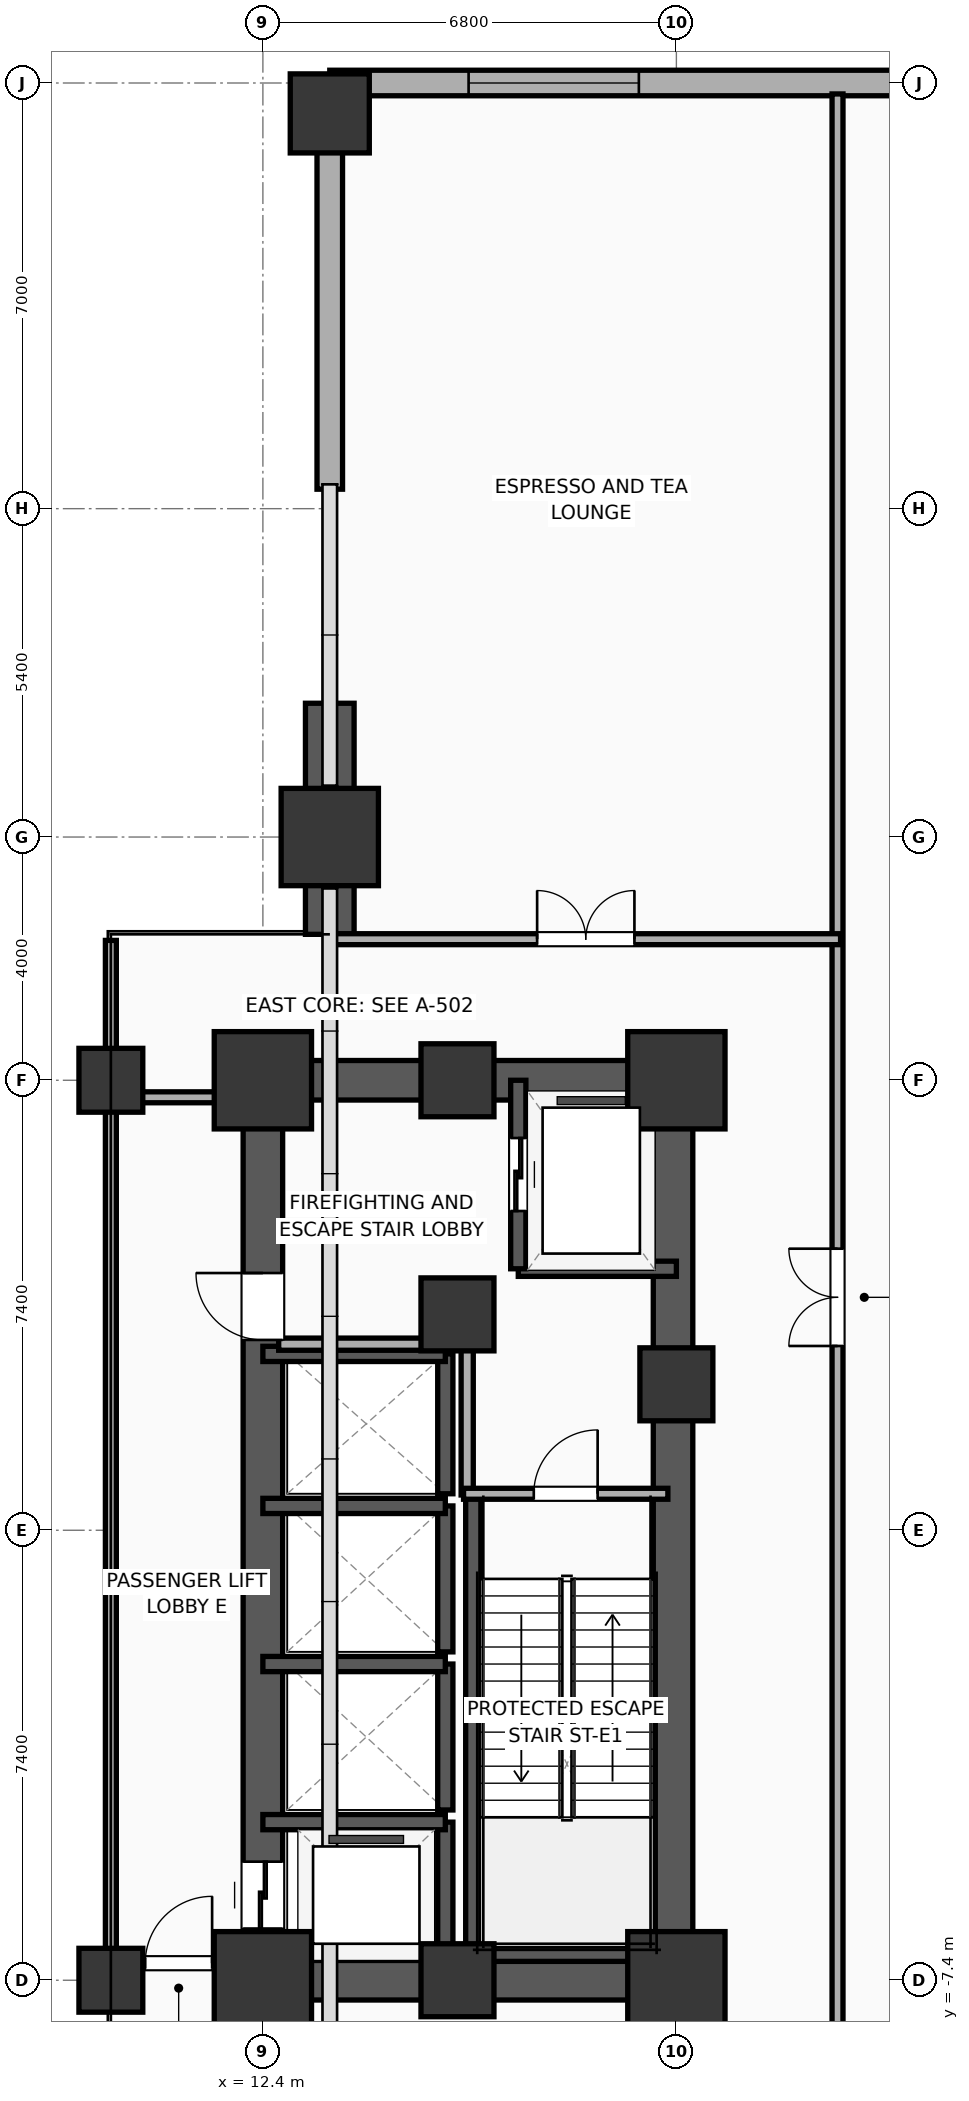
"""IFC4 building model, lengths in metres.
Left out: names, types, materials, properties, quantities, classifications, styles, units other than length and angle.
Written with IfcOpenShell. Run it as: python <this file> out.ifc"""

import sys

from ifc_helpers import new_model, si_unit, direction, frame, frame_2d, origin, origin_2d, place, context, subcontext, project, spatial, rectangle, extrude, element, fill, save


model = new_model("IFC4")
c1 = context("Model", 3, precision=1e-05, world=origin(), true_north=direction((0.0, 1.0)))
c2 = subcontext(c1, "Body", "Model", "MODEL_VIEW")
j1 = project(units=[si_unit("LENGTHUNIT", "METRE"), si_unit("PLANEANGLEUNIT", "RADIAN")], contexts=[c1])
p1 = place(None, origin())
s1 = spatial("IfcSite", under=j1, at=p1, CompositionType="ELEMENT")
p2 = place(p1, origin())
s2 = spatial("IfcBuilding", under=s1, at=p2, CompositionType="ELEMENT")
p3 = place(p2, frame((0.0, 0.0, 5.2)))
s3 = spatial("IfcBuildingStorey", under=s2, at=p3, CompositionType="ELEMENT", Elevation=5.2)
p4 = place(p3, frame((12.4, -7.4, 0.0), z_axis=(0.0, 0.0, 1.0), x_axis=(1.0, 0.0, 0.0)))
e1 = element("IfcColumn", 1, at=p4, inside=s3, PredefinedType="COLUMN", context=c2, shape_type="SweptSolid", body=[
    extrude(rectangle(XDim=1.6, YDim=1.6, at=origin_2d()), origin(), (0.0, 0.0, 1.0), 5.2),
])
p5 = place(p3, frame((15.6, 3.55, 0.0), z_axis=(0.0, 0.0, 1.0), x_axis=(1.0, 0.0, 0.0)))
e2 = element("IfcColumn", 2, at=p5, inside=s3, PredefinedType="COLUMN", context=c2, shape_type="SweptSolid", body=[
    extrude(rectangle(XDim=1.2, YDim=1.2, at=origin_2d()), origin(), (0.0, 0.0, 1.0), 5.2),
])
p6 = place(p3, frame((12.4, 7.4, 0.0), z_axis=(0.0, 0.0, 1.0), x_axis=(1.0, 0.0, 0.0)))
e3 = element("IfcColumn", 3, at=p6, inside=s3, PredefinedType="COLUMN", context=c2, shape_type="SweptSolid", body=[
    extrude(rectangle(XDim=1.6, YDim=1.6, at=origin_2d()), origin(), (0.0, 0.0, 1.0), 5.2),
])
for number, where, z_axis, x_axis in (
    (4, (15.6, -7.4, 0.0), (0.0, 0.0, 1.0), (1.0, 0.0, 0.0)),
    (5, (15.6, 7.4, 0.0), (0.0, 0.0, 1.0), (1.0, 0.0, 0.0)),
):
    element("IfcColumn", number, at=place(p3, frame(where, z_axis=z_axis, x_axis=x_axis)), inside=s3, PredefinedType="COLUMN", context=c2, shape_type="SweptSolid", body=[
        extrude(rectangle(XDim=1.2, YDim=1.2, at=origin_2d()), origin(), (0.0, 0.0, 1.0), 5.2),
    ])
p7 = place(p3, frame((19.2, -7.4, 0.0), z_axis=(0.0, 0.0, 1.0), x_axis=(1.0, 0.0, 0.0)))
e6 = element("IfcColumn", 6, at=p7, inside=s3, PredefinedType="COLUMN", context=c2, shape_type="SweptSolid", body=[
    extrude(rectangle(XDim=1.6, YDim=1.6, at=origin_2d()), origin(), (0.0, 0.0, 1.0), 5.2),
])
p8 = place(p3, frame((19.2, 2.4, 0.0), z_axis=(0.0, 0.0, 1.0), x_axis=(1.0, 0.0, 0.0)))
e7 = element("IfcColumn", 7, at=p8, inside=s3, PredefinedType="COLUMN", context=c2, shape_type="SweptSolid", body=[
    extrude(rectangle(XDim=1.2, YDim=1.2, at=origin_2d()), origin(), (0.0, 0.0, 1.0), 5.2),
])
p9 = place(p3, frame((19.2, 7.4, 0.0), z_axis=(0.0, 0.0, 1.0), x_axis=(1.0, 0.0, 0.0)))
e8 = element("IfcColumn", 8, at=p9, inside=s3, PredefinedType="COLUMN", context=c2, shape_type="SweptSolid", body=[
    extrude(rectangle(XDim=1.6, YDim=1.6, at=origin_2d()), origin(), (0.0, 0.0, 1.0), 5.2),
])
for number, where, z_axis, x_axis in (
    (9, (12.075, -7.4, 0.0), (0.0, 0.0, 1.0), (1.0, 0.0, 0.0)),
    (10, (12.075, 7.4, 0.0), (0.0, 0.0, 1.0), (1.0, 0.0, 0.0)),
):
    element("IfcWall", number, at=place(p3, frame(where, z_axis=z_axis, x_axis=x_axis)), inside=s3, PredefinedType="SHEAR", context=c2, shape_type="SweptSolid", body=[
        extrude(rectangle(XDim=7.45, YDim=0.65, at=frame_2d((3.725, 0.0))), origin(), (0.0, 0.0, 1.0), 4.92),
    ])
p10 = place(p3, frame((12.4, -7.4, 0.0), z_axis=(0.0, 0.0, 1.0), x_axis=(0.0, 1.0, 0.0)))
e11 = element("IfcWall", 11, at=p10, inside=s3, PredefinedType="SHEAR", context=c2, shape_type="SweptSolid", body=[
    extrude(rectangle(XDim=14.8, YDim=0.65, at=frame_2d((7.4, 0.0))), origin(), (0.0, 0.0, 1.0), 4.92),
])
p11 = place(p10, frame((0.85, 0.0, 0.0)))
e12 = element("IfcOpeningElement", 12, at=p11, cuts=e11, PredefinedType="OPENING", context=c2, shape_type="SweptSolid", body=[
    extrude(rectangle(XDim=1.1, YDim=2.05, at=frame_2d((0.55, 1.025))), frame((0.0, 0.335, 0.0), z_axis=(0.0, -1.0, 0.0), x_axis=(1.0, 0.0, 0.0)), (0.0, 0.0, 1.0), 0.67),
])
p12 = place(p10, frame((10.53, 0.0, 0.0)))
e13 = element("IfcOpeningElement", 13, at=p12, cuts=e11, PredefinedType="OPENING", context=c2, shape_type="SweptSolid", body=[
    extrude(rectangle(XDim=1.1, YDim=2.05, at=frame_2d((0.55, 1.025))), frame((0.0, 0.335, 0.0), z_axis=(0.0, -1.0, 0.0), x_axis=(1.0, 0.0, 0.0)), (0.0, 0.0, 1.0), 0.67),
])
p13 = place(p3, frame((19.145, -7.4, 0.0), z_axis=(0.0, 0.0, 1.0), x_axis=(0.0, 1.0, 0.0)))
e14 = element("IfcWall", 14, at=p13, inside=s3, PredefinedType="SHEAR", context=c2, shape_type="SweptSolid", body=[
    extrude(rectangle(XDim=14.8, YDim=0.65, at=frame_2d((7.4, 0.0))), origin(), (0.0, 0.0, 1.0), 4.92),
])
p14 = place(p3, frame((15.86, -7.085, 0.0), z_axis=(0.0, 0.0, 1.0), x_axis=(0.0, 1.0, 0.0)))
e15 = element("IfcWall", 15, at=p14, inside=s3, PredefinedType="SOLIDWALL", context=c2, shape_type="SweptSolid", body=[
    extrude(rectangle(XDim=7.685, YDim=0.25, at=frame_2d((3.843, 0.0))), origin(), (0.0, 0.0, 1.0), 4.92),
])
p15 = place(p3, frame((15.74, -6.965, 0.0), z_axis=(0.0, 0.0, 1.0), x_axis=(1.0, 0.0, 0.0)))
e16 = element("IfcWall", 16, at=p15, inside=s3, PredefinedType="SOLIDWALL", context=c2, shape_type="SweptSolid", body=[
    extrude(rectangle(XDim=3.46, YDim=0.25, at=frame_2d((1.73, 0.0))), origin(), (0.0, 0.0, 1.0), 4.92),
])
for number, where, z_axis, x_axis in (
    (17, (9.9, -7.4, 0.0), (0.0, 0.0, 1.0), (1.0, 0.0, 0.0)),
    (18, (9.9, 7.4, 0.0), (0.0, 0.0, 1.0), (1.0, 0.0, 0.0)),
):
    element("IfcColumn", number, at=place(p3, frame(where, z_axis=z_axis, x_axis=x_axis)), inside=s3, PredefinedType="COLUMN", context=c2, shape_type="SweptSolid", body=[
        extrude(rectangle(XDim=1.05, YDim=1.05, at=origin_2d()), origin(), (0.0, 0.0, 1.0), 5.2),
    ])
p16 = place(p3, frame((13.5, 11.4, 0.0), z_axis=(0.0, 0.0, 1.0), x_axis=(1.0, 0.0, 0.0)))
e19 = element("IfcColumn", 19, at=p16, inside=s3, PredefinedType="COLUMN", context=c2, shape_type="SweptSolid", body=[
    extrude(rectangle(XDim=1.6, YDim=1.6, at=origin_2d()), origin(), (0.0, 0.0, 1.0), 5.2),
])
p17 = place(p3, frame((13.5, 23.3, 0.0), z_axis=(0.0, 0.0, 1.0), x_axis=(1.0, 0.0, 0.0)))
e20 = element("IfcColumn", 20, at=p17, inside=s3, PredefinedType="COLUMN", context=c2, shape_type="SweptSolid", body=[
    extrude(rectangle(XDim=1.3, YDim=1.3, at=origin_2d()), origin(), (0.0, 0.0, 1.0), 5.2),
])
p18 = place(p3, frame((13.5, 9.8, 0.0), z_axis=(0.0, 0.0, 1.0), x_axis=(0.0, 1.0, 0.0)))
e21 = element("IfcWall", 21, at=p18, inside=s3, PredefinedType="SOLIDWALL", context=c2, shape_type="SweptSolid", body=[
    extrude(rectangle(XDim=3.8, YDim=0.8, at=frame_2d((1.9, 0.0))), origin(), (0.0, 0.0, 1.0), 4.92),
])
p19 = place(p3, frame((35.6, 23.8, 0.0), z_axis=(0.0, 0.0, 1.0), x_axis=(-1.0, 0.0, 0.0)))
e22 = element("IfcWall", 22, at=p19, inside=s3, PredefinedType="ELEMENTEDWALL", context=c2, shape_type="SweptSolid", body=[
    extrude(rectangle(XDim=22.1, YDim=0.42, at=frame_2d((11.05, 0.0))), origin(), (0.0, 0.0, 1.0), 4.92),
])
p20 = place(p19, frame((2.283, 0.0, 0.65)))
e23 = element("IfcOpeningElement", 23, at=p20, cuts=e22, PredefinedType="OPENING", context=c2, shape_type="SweptSolid", body=[
    extrude(rectangle(XDim=2.8, YDim=2.6, at=frame_2d((1.4, 1.3))), frame((0.0, 0.22, 0.0), z_axis=(0.0, -1.0, 0.0), x_axis=(1.0, 0.0, 0.0)), (0.0, 0.0, 1.0), 0.44),
])
p21 = place(p19, frame((17.017, 0.0, 0.65)))
e24 = element("IfcOpeningElement", 24, at=p21, cuts=e22, PredefinedType="OPENING", context=c2, shape_type="SweptSolid", body=[
    extrude(rectangle(XDim=2.8, YDim=2.6, at=frame_2d((1.4, 1.3))), frame((0.0, 0.22, 0.0), z_axis=(0.0, -1.0, 0.0), x_axis=(1.0, 0.0, 0.0)), (0.0, 0.0, 1.0), 0.44),
])
p22 = place(p3, frame((13.5, 17.12, 0.0), z_axis=(0.0, 0.0, 1.0), x_axis=(0.0, 1.0, 0.0)))
e25 = element("IfcWall", 25, at=p22, inside=s3, PredefinedType="ELEMENTEDWALL", context=c2, shape_type="SweptSolid", body=[
    extrude(rectangle(XDim=6.68, YDim=0.42, at=frame_2d((3.34, 0.0))), origin(), (0.0, 0.0, 1.0), 4.21),
])
p23 = place(p3, frame((16.6, 4.3, 0.0), z_axis=(0.0, 0.0, 1.0), x_axis=(1.0, 0.0, 0.0)))
e26 = element("IfcWall", 26, at=p23, inside=s3, PredefinedType="SOLIDWALL", context=c2, shape_type="SweptSolid", body=[
    extrude(rectangle(XDim=2.6, YDim=0.25, at=frame_2d((1.3, 0.0))), origin(), (0.0, 0.0, 1.0), 4.92),
])
p24 = place(p3, frame((16.6, 7.4, 0.0), z_axis=(0.0, 0.0, 1.0), x_axis=(0.0, -1.0, 0.0)))
e27 = element("IfcWall", 27, at=p24, inside=s3, PredefinedType="SOLIDWALL", context=c2, shape_type="SweptSolid", body=[
    extrude(rectangle(XDim=3.1, YDim=0.25, at=frame_2d((1.55, 0.0))), origin(), (0.0, 0.0, 1.0), 4.92),
])
p25 = place(p24, frame((0.95, 0.0, 0.0)))
e28 = element("IfcOpeningElement", 28, at=p25, cuts=e27, PredefinedType="OPENING", context=c2, shape_type="SweptSolid", body=[
    extrude(rectangle(XDim=1.2, YDim=2.05, at=frame_2d((0.6, 1.025))), frame((0.0, 0.135, 0.0), z_axis=(0.0, -1.0, 0.0), x_axis=(1.0, 0.0, 0.0)), (0.0, 0.0, 1.0), 0.27),
])
p26 = place(p3, frame((15.4, -7.4, 0.0), z_axis=(0.0, 0.0, 1.0), x_axis=(0.0, 1.0, 0.0)))
e29 = element("IfcWall", 29, at=p26, inside=s3, PredefinedType="SOLIDWALL", context=c2, shape_type="SweptSolid", body=[
    extrude(rectangle(XDim=2.6, YDim=0.25, at=frame_2d((1.3, 0.0))), origin(), (0.0, 0.0, 1.0), 4.92),
])
p27 = place(p3, frame((15.4, -4.8, 0.0), z_axis=(0.0, 0.0, 1.0), x_axis=(-1.0, 0.0, 0.0)))
e30 = element("IfcWall", 30, at=p27, inside=s3, PredefinedType="SOLIDWALL", context=c2, shape_type="SweptSolid", body=[
    extrude(rectangle(XDim=3.0, YDim=0.25, at=frame_2d((1.5, 0.0))), origin(), (0.0, 0.0, 1.0), 4.92),
])
p28 = place(p3, frame((15.4, -4.6, 0.0), z_axis=(0.0, 0.0, 1.0), x_axis=(0.0, 1.0, 0.0)))
e31 = element("IfcWall", 31, at=p28, inside=s3, PredefinedType="SOLIDWALL", context=c2, shape_type="SweptSolid", body=[
    extrude(rectangle(XDim=2.4, YDim=0.25, at=frame_2d((1.2, 0.0))), origin(), (0.0, 0.0, 1.0), 4.92),
])
p29 = place(p3, frame((15.4, -2.2, 0.0), z_axis=(0.0, 0.0, 1.0), x_axis=(-1.0, 0.0, 0.0)))
e32 = element("IfcWall", 32, at=p29, inside=s3, PredefinedType="SOLIDWALL", context=c2, shape_type="SweptSolid", body=[
    extrude(rectangle(XDim=3.0, YDim=0.25, at=frame_2d((1.5, 0.0))), origin(), (0.0, 0.0, 1.0), 4.92),
])
p30 = place(p3, frame((15.4, -2.0, 0.0), z_axis=(0.0, 0.0, 1.0), x_axis=(0.0, 1.0, 0.0)))
e33 = element("IfcWall", 33, at=p30, inside=s3, PredefinedType="SOLIDWALL", context=c2, shape_type="SweptSolid", body=[
    extrude(rectangle(XDim=2.4, YDim=0.25, at=frame_2d((1.2, 0.0))), origin(), (0.0, 0.0, 1.0), 4.92),
])
p31 = place(p3, frame((15.4, 0.4, 0.0), z_axis=(0.0, 0.0, 1.0), x_axis=(-1.0, 0.0, 0.0)))
e34 = element("IfcWall", 34, at=p31, inside=s3, PredefinedType="SOLIDWALL", context=c2, shape_type="SweptSolid", body=[
    extrude(rectangle(XDim=3.0, YDim=0.25, at=frame_2d((1.5, 0.0))), origin(), (0.0, 0.0, 1.0), 4.92),
])
p32 = place(p3, frame((15.4, 0.6, 0.0), z_axis=(0.0, 0.0, 1.0), x_axis=(0.0, 1.0, 0.0)))
e35 = element("IfcWall", 35, at=p32, inside=s3, PredefinedType="SOLIDWALL", context=c2, shape_type="SweptSolid", body=[
    extrude(rectangle(XDim=2.3, YDim=0.25, at=frame_2d((1.15, 0.0))), origin(), (0.0, 0.0, 1.0), 4.92),
])
p33 = place(p3, frame((15.4, 2.9, 0.0), z_axis=(0.0, 0.0, 1.0), x_axis=(-1.0, 0.0, 0.0)))
e36 = element("IfcWall", 36, at=p33, inside=s3, PredefinedType="SOLIDWALL", context=c2, shape_type="SweptSolid", body=[
    extrude(rectangle(XDim=3.0, YDim=0.25, at=frame_2d((1.5, 0.0))), origin(), (0.0, 0.0, 1.0), 4.92),
])
p34 = place(p3, frame((15.76, 0.58, 0.0), z_axis=(0.0, 0.0, 1.0), x_axis=(0.0, 1.0, 0.0)))
e37 = element("IfcWall", 37, at=p34, inside=s3, PredefinedType="PARTITIONING", context=c2, shape_type="SweptSolid", body=[
    extrude(rectangle(XDim=2.52, YDim=0.2, at=frame_2d((1.26, 0.0))), origin(), (0.0, 0.0, 1.0), 4.92),
])
p35 = place(p3, frame((12.66, 3.06, 0.0), z_axis=(0.0, 0.0, 1.0), x_axis=(1.0, 0.0, 0.0)))
e38 = element("IfcWall", 38, at=p35, inside=s3, PredefinedType="PARTITIONING", context=c2, shape_type="SweptSolid", body=[
    extrude(rectangle(XDim=3.16, YDim=0.2, at=frame_2d((1.58, 0.0))), origin(), (0.0, 0.0, 1.0), 4.92),
])
p36 = place(p3, frame((15.7, 0.6, 0.0), z_axis=(0.0, 0.0, 1.0), x_axis=(1.0, 0.0, 0.0)))
e39 = element("IfcWall", 39, at=p36, inside=s3, PredefinedType="PARTITIONING", context=c2, shape_type="SweptSolid", body=[
    extrude(rectangle(XDim=3.36, YDim=0.18, at=frame_2d((1.68, 0.0))), origin(), (0.0, 0.0, 1.0), 4.92),
])
p37 = place(p36, frame((1.155, 0.0, 0.0)))
e40 = element("IfcOpeningElement", 40, at=p37, cuts=e39, PredefinedType="OPENING", context=c2, shape_type="SweptSolid", body=[
    extrude(rectangle(XDim=1.05, YDim=2.05, at=frame_2d((0.525, 1.025))), frame((0.0, 0.1, 0.0), z_axis=(0.0, -1.0, 0.0), x_axis=(1.0, 0.0, 0.0)), (0.0, 0.0, 1.0), 0.2),
])
p38 = place(p3, frame((9.88, 7.12, 0.0), z_axis=(0.0, 0.0, 1.0), x_axis=(1.0, 0.0, 0.0)))
e41 = element("IfcWall", 41, at=p38, inside=s3, PredefinedType="PARTITIONING", context=c2, shape_type="SweptSolid", body=[
    extrude(rectangle(XDim=2.27, YDim=0.18, at=frame_2d((1.135, 0.0))), origin(), (0.0, 0.0, 1.0), 4.21),
])
p39 = place(p3, frame((9.88, -7.12, 0.0), z_axis=(0.0, 0.0, 1.0), x_axis=(1.0, 0.0, 0.0)))
e42 = element("IfcWall", 42, at=p39, inside=s3, PredefinedType="PARTITIONING", context=c2, shape_type="SweptSolid", body=[
    extrude(rectangle(XDim=2.27, YDim=0.18, at=frame_2d((1.135, 0.0))), origin(), (0.0, 0.0, 1.0), 4.21),
])
p40 = place(p39, frame((0.585, 0.0, 0.0)))
e43 = element("IfcOpeningElement", 43, at=p40, cuts=e42, PredefinedType="OPENING", context=c2, shape_type="SweptSolid", body=[
    extrude(rectangle(XDim=1.1, YDim=2.05, at=frame_2d((0.55, 1.025))), frame((0.0, 0.1, 0.0), z_axis=(0.0, -1.0, 0.0), x_axis=(1.0, 0.0, 0.0)), (0.0, 0.0, 1.0), 0.2),
])
p41 = place(p3, frame((9.9, -7.12, 0.0), z_axis=(0.0, 0.0, 1.0), x_axis=(0.0, 1.0, 0.0)))
e44 = element("IfcWall", 44, at=p41, inside=s3, PredefinedType="PARTITIONING", context=c2, shape_type="SweptSolid", body=[
    extrude(rectangle(XDim=16.82, YDim=0.18, at=frame_2d((8.41, 0.0))), origin(), (0.0, 0.0, 1.0), 4.21),
])
p42 = place(p3, frame((21.85, -10.5, 0.0), z_axis=(0.0, 0.0, 1.0), x_axis=(0.0, 1.0, 0.0)))
e45 = element("IfcWall", 45, at=p42, inside=s3, PredefinedType="PARTITIONING", context=c2, shape_type="SweptSolid", body=[
    extrude(rectangle(XDim=34.12, YDim=0.18, at=frame_2d((17.06, 0.0))), origin(), (0.0, 0.0, 1.0), 4.92),
])
p43 = place(p42, frame((13.531, 0.0, 0.0)))
e46 = element("IfcOpeningElement", 46, at=p43, cuts=e45, PredefinedType="OPENING", context=c2, shape_type="SweptSolid", body=[
    extrude(rectangle(XDim=1.6, YDim=2.05, at=frame_2d((0.8, 1.025))), frame((0.0, 0.1, 0.0), z_axis=(0.0, -1.0, 0.0), x_axis=(1.0, 0.0, 0.0)), (0.0, 0.0, 1.0), 0.2),
])
p44 = place(p3, frame((13.52, 9.72, 0.0), z_axis=(0.0, 0.0, 1.0), x_axis=(1.0, 0.0, 0.0)))
e47 = element("IfcWall", 47, at=p44, inside=s3, PredefinedType="PARTITIONING", context=c2, shape_type="SweptSolid", body=[
    extrude(rectangle(XDim=8.38, YDim=0.18, at=frame_2d((4.19, 0.0))), origin(), (0.0, 0.0, 1.0), 4.92),
])
p45 = place(p44, frame((3.39, 0.0, 0.0)))
e48 = element("IfcOpeningElement", 48, at=p45, cuts=e47, PredefinedType="OPENING", context=c2, shape_type="SweptSolid", body=[
    extrude(rectangle(XDim=1.6, YDim=2.05, at=frame_2d((0.8, 1.025))), frame((0.0, 0.1, 0.0), z_axis=(0.0, -1.0, 0.0), x_axis=(1.0, 0.0, 0.0)), (0.0, 0.0, 1.0), 0.2),
])
p46 = place(p21, origin())
e49 = element("IfcWindow", 49, at=p46, inside=s3, PartitioningType="SINGLE_PANEL", PredefinedType="WINDOW", context=c2, shape_type="SweptSolid", body=[
    extrude(rectangle(XDim=2.8, YDim=2.6, at=frame_2d((1.4, 1.3))), frame((0.0, 0.03, 0.0), z_axis=(0.0, -1.0, 0.0), x_axis=(1.0, 0.0, 0.0)), (0.0, 0.0, 1.0), 0.06),
])
fill(e24, e49)
p47 = place(p25, origin())
e50 = element("IfcDoor", 50, at=p47, inside=s3, OperationType="SLIDING_TO_LEFT", PredefinedType="DOOR", context=c2, shape_type="SweptSolid", body=[
    extrude(rectangle(XDim=1.2, YDim=2.05, at=frame_2d((0.6, 1.025))), frame((0.0, 0.025, 0.0), z_axis=(0.0, -1.0, 0.0), x_axis=(1.0, 0.0, 0.0)), (0.0, 0.0, 1.0), 0.05),
])
fill(e28, e50)
p48 = place(p11, origin())
e51 = element("IfcDoor", 51, at=p48, inside=s3, OperationType="SLIDING_TO_LEFT", PredefinedType="DOOR", context=c2, shape_type="SweptSolid", body=[
    extrude(rectangle(XDim=1.1, YDim=2.05, at=frame_2d((0.55, 1.025))), frame((0.0, 0.025, 0.0), z_axis=(0.0, -1.0, 0.0), x_axis=(1.0, 0.0, 0.0)), (0.0, 0.0, 1.0), 0.05),
])
fill(e12, e51)
p49 = place(p37, origin())
e52 = element("IfcDoor", 52, at=p49, inside=s3, OperationType="SINGLE_SWING_RIGHT", PredefinedType="DOOR", context=c2, shape_type="SweptSolid", body=[
    extrude(rectangle(XDim=1.05, YDim=2.05, at=frame_2d((0.525, 1.025))), frame((0.0, 0.025, 0.0), z_axis=(0.0, -1.0, 0.0), x_axis=(1.0, 0.0, 0.0)), (0.0, 0.0, 1.0), 0.05),
])
fill(e40, e52)
p50 = place(p40, origin())
e53 = element("IfcDoor", 53, at=p50, inside=s3, OperationType="SINGLE_SWING_RIGHT", PredefinedType="DOOR", context=c2, shape_type="SweptSolid", body=[
    extrude(rectangle(XDim=1.1, YDim=2.05, at=frame_2d((0.55, 1.025))), frame((0.0, 0.025, 0.0), z_axis=(0.0, -1.0, 0.0), x_axis=(1.0, 0.0, 0.0)), (0.0, 0.0, 1.0), 0.05),
])
fill(e43, e53)
p51 = place(p43, origin())
e54 = element("IfcDoor", 54, at=p51, inside=s3, OperationType="DOUBLE_DOOR_SINGLE_SWING", PredefinedType="DOOR", context=c2, shape_type="SweptSolid", body=[
    extrude(rectangle(XDim=1.6, YDim=2.05, at=frame_2d((0.8, 1.025))), frame((0.0, 0.025, 0.0), z_axis=(0.0, -1.0, 0.0), x_axis=(1.0, 0.0, 0.0)), (0.0, 0.0, 1.0), 0.05),
])
fill(e46, e54)
p52 = place(p45, origin())
e55 = element("IfcDoor", 55, at=p52, inside=s3, OperationType="DOUBLE_DOOR_SINGLE_SWING", PredefinedType="DOOR", context=c2, shape_type="SweptSolid", body=[
    extrude(rectangle(XDim=1.6, YDim=2.05, at=frame_2d((0.8, 1.025))), frame((0.0, 0.025, 0.0), z_axis=(0.0, -1.0, 0.0), x_axis=(1.0, 0.0, 0.0)), (0.0, 0.0, 1.0), 0.05),
])
fill(e48, e55)
p53 = place(p12, origin())
e56 = element("IfcDoor", 56, at=p53, inside=s3, OperationType="SINGLE_SWING_RIGHT", PredefinedType="DOOR", context=c2, shape_type="SweptSolid", body=[
    extrude(rectangle(XDim=1.1, YDim=2.05, at=frame_2d((0.55, 1.025))), frame((0.0, 0.025, 0.0), z_axis=(0.0, -1.0, 0.0), x_axis=(1.0, 0.0, 0.0)), (0.0, 0.0, 1.0), 0.05),
])
fill(e13, e56)
save(model, sys.argv[1])
